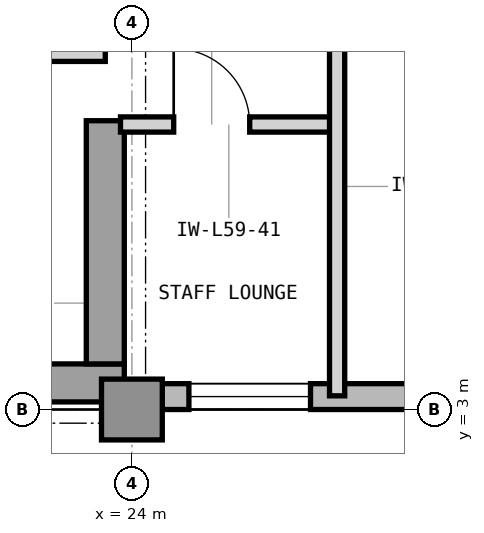
"""IFC4 building model, lengths in metres.
Left out: names, types, materials, properties, quantities, classifications, styles, units other than length and angle.
Written with IfcOpenShell. Run it as: python <this file> out.ifc"""

import sys

from ifc_helpers import new_model, si_unit, direction, frame, frame_2d, origin, origin_2d, place, context, subcontext, project, spatial, rectangle, extrude, element, fill, save


model = new_model("IFC4")
c1 = context("Model", 3, precision=1e-05, world=origin(), true_north=direction((0.0, 1.0)))
c2 = subcontext(c1, "Body", "Model", "MODEL_VIEW")
j1 = project(units=[si_unit("LENGTHUNIT", "METRE"), si_unit("PLANEANGLEUNIT", "RADIAN")], contexts=[c1])
p1 = place(None, origin())
s1 = spatial("IfcSite", under=j1, at=p1, CompositionType="ELEMENT")
p2 = place(p1, origin())
s2 = spatial("IfcBuilding", under=s1, at=p2, CompositionType="ELEMENT")
p3 = place(p2, frame((0.0, 0.0, 243.0)))
s3 = spatial("IfcBuildingStorey", under=s2, at=p3, CompositionType="ELEMENT", Elevation=243.0)
p4 = place(p3, frame((7.475, 3.35, 0.0), z_axis=(0.0, 0.0, 1.0), x_axis=(1.0, 0.0, 0.0)))
e1 = element("IfcWall", 1, at=p4, inside=s3, PredefinedType="SHEAR", context=c2, shape_type="SweptSolid", body=[
    extrude(rectangle(XDim=16.425, YDim=0.5, at=frame_2d((8.212, 0.0))), origin(), (0.0, 0.0, 1.0), 3.9),
])
p5 = place(p3, frame((23.65, 3.6, 0.0), z_axis=(0.0, 0.0, 1.0), x_axis=(0.0, 1.0, 0.0)))
e2 = element("IfcWall", 2, at=p5, inside=s3, PredefinedType="SHEAR", context=c2, shape_type="SweptSolid", body=[
    extrude(rectangle(XDim=3.2, YDim=0.5, at=frame_2d((1.6, 0.0))), origin(), (0.0, 0.0, 1.0), 3.9),
])
p6 = place(p3, frame((24.0, 3.0, 0.0), z_axis=(0.0, 0.0, 1.0), x_axis=(1.0, 0.0, 0.0)))
e3 = element("IfcColumn", 3, at=p6, inside=s3, PredefinedType="COLUMN", context=c2, shape_type="SweptSolid", body=[
    extrude(rectangle(XDim=0.8, YDim=0.8, at=origin_2d()), origin(), (0.0, 0.0, 1.0), 3.9),
])
p7 = place(p3, frame((23.9, 3.17, 0.0), z_axis=(0.0, 0.0, 1.0), x_axis=(1.0, 0.0, 0.0)))
e4 = element("IfcWall", 4, at=p7, inside=s3, PredefinedType="STANDARD", context=c2, shape_type="SweptSolid", body=[
    extrude(rectangle(XDim=28.5, YDim=0.34, at=frame_2d((14.25, 0.0))), origin(), (0.0, 0.0, 1.0), 3.7),
])
p8 = place(p7, frame((10.725, 0.0, 0.9)))
e5 = element("IfcOpeningElement", 5, at=p8, cuts=e4, PredefinedType="OPENING", context=c2, shape_type="SweptSolid", body=[
    extrude(rectangle(XDim=2.3, YDim=2.2, at=frame_2d((1.15, 1.1))), frame((0.0, 0.18, 0.0), z_axis=(0.0, -1.0, 0.0), x_axis=(1.0, 0.0, 0.0)), (0.0, 0.0, 1.0), 0.36),
])
p9 = place(p7, frame((0.85, 0.0, 0.9)))
e6 = element("IfcOpeningElement", 6, at=p9, cuts=e4, PredefinedType="OPENING", context=c2, shape_type="SweptSolid", body=[
    extrude(rectangle(XDim=1.6, YDim=2.2, at=frame_2d((0.8, 1.1))), frame((0.0, 0.18, 0.0), z_axis=(0.0, -1.0, 0.0), x_axis=(1.0, 0.0, 0.0)), (0.0, 0.0, 1.0), 0.36),
])
p10 = place(p7, frame((19.075, 0.0, 0.9)))
e7 = element("IfcOpeningElement", 7, at=p10, cuts=e4, PredefinedType="OPENING", context=c2, shape_type="SweptSolid", body=[
    extrude(rectangle(XDim=2.3, YDim=2.2, at=frame_2d((1.15, 1.1))), frame((0.0, 0.18, 0.0), z_axis=(0.0, -1.0, 0.0), x_axis=(1.0, 0.0, 0.0)), (0.0, 0.0, 1.0), 0.36),
])
p11 = place(p3, frame((20.55, 7.68, 0.0), z_axis=(0.0, 0.0, 1.0), x_axis=(1.0, 0.0, 0.0)))
e8 = element("IfcWall", 8, at=p11, inside=s3, PredefinedType="PARTITIONING", context=c2, shape_type="SweptSolid", body=[
    extrude(rectangle(XDim=3.1, YDim=0.2, at=frame_2d((1.55, 0.0))), origin(), (0.0, 0.0, 1.0), 3.69),
])
p12 = place(p11, frame((1.075, 0.0, 0.0)))
e9 = element("IfcOpeningElement", 9, at=p12, cuts=e8, PredefinedType="OPENING", context=c2, shape_type="SweptSolid", body=[
    extrude(rectangle(XDim=0.95, YDim=2.1, at=frame_2d((0.475, 1.05))), frame((0.0, 0.11, 0.0), z_axis=(0.0, -1.0, 0.0), x_axis=(1.0, 0.0, 0.0)), (0.0, 0.0, 1.0), 0.22),
])
p13 = place(p3, frame((23.85, 6.75, 0.0), z_axis=(0.0, 0.0, 1.0), x_axis=(1.0, 0.0, 0.0)))
e10 = element("IfcWall", 10, at=p13, inside=s3, PredefinedType="PARTITIONING", context=c2, shape_type="SweptSolid", body=[
    extrude(rectangle(XDim=2.85, YDim=0.2, at=frame_2d((1.425, 0.0))), origin(), (0.0, 0.0, 1.0), 3.69),
])
p14 = place(p13, frame((0.7, 0.0, 0.0)))
e11 = element("IfcOpeningElement", 11, at=p14, cuts=e10, PredefinedType="OPENING", context=c2, shape_type="SweptSolid", body=[
    extrude(rectangle(XDim=1.0, YDim=2.15, at=frame_2d((0.5, 1.075))), frame((0.0, 0.11, 0.0), z_axis=(0.0, -1.0, 0.0), x_axis=(1.0, 0.0, 0.0)), (0.0, 0.0, 1.0), 0.22),
])
p15 = place(p3, frame((26.7, 3.18, 0.0), z_axis=(0.0, 0.0, 1.0), x_axis=(0.0, 1.0, 0.0)))
e12 = element("IfcWall", 12, at=p15, inside=s3, PredefinedType="PARTITIONING", context=c2, shape_type="SweptSolid", body=[
    extrude(rectangle(XDim=11.02, YDim=0.2, at=frame_2d((5.51, 0.0))), origin(), (0.0, 0.0, 1.0), 3.69),
])
p16 = place(p14, origin())
e13 = element("IfcDoor", 13, at=p16, inside=s3, OperationType="SINGLE_SWING_LEFT", PredefinedType="DOOR", context=c2, shape_type="SweptSolid", body=[
    extrude(rectangle(XDim=1.0, YDim=2.15, at=frame_2d((0.5, 1.075))), frame((0.0, 0.025, 0.0), z_axis=(0.0, -1.0, 0.0), x_axis=(1.0, 0.0, 0.0)), (0.0, 0.0, 1.0), 0.05),
])
fill(e11, e13)
p17 = place(p9, origin())
e14 = element("IfcWindow", 14, at=p17, inside=s3, PartitioningType="SINGLE_PANEL", PredefinedType="WINDOW", context=c2, shape_type="SweptSolid", body=[
    extrude(rectangle(XDim=1.6, YDim=2.2, at=frame_2d((0.8, 1.1))), frame((0.0, 0.11, 0.0), z_axis=(0.0, -1.0, 0.0), x_axis=(1.0, 0.0, 0.0)), (0.0, 0.0, 1.0), 0.06),
])
fill(e6, e14)
save(model, sys.argv[1])
